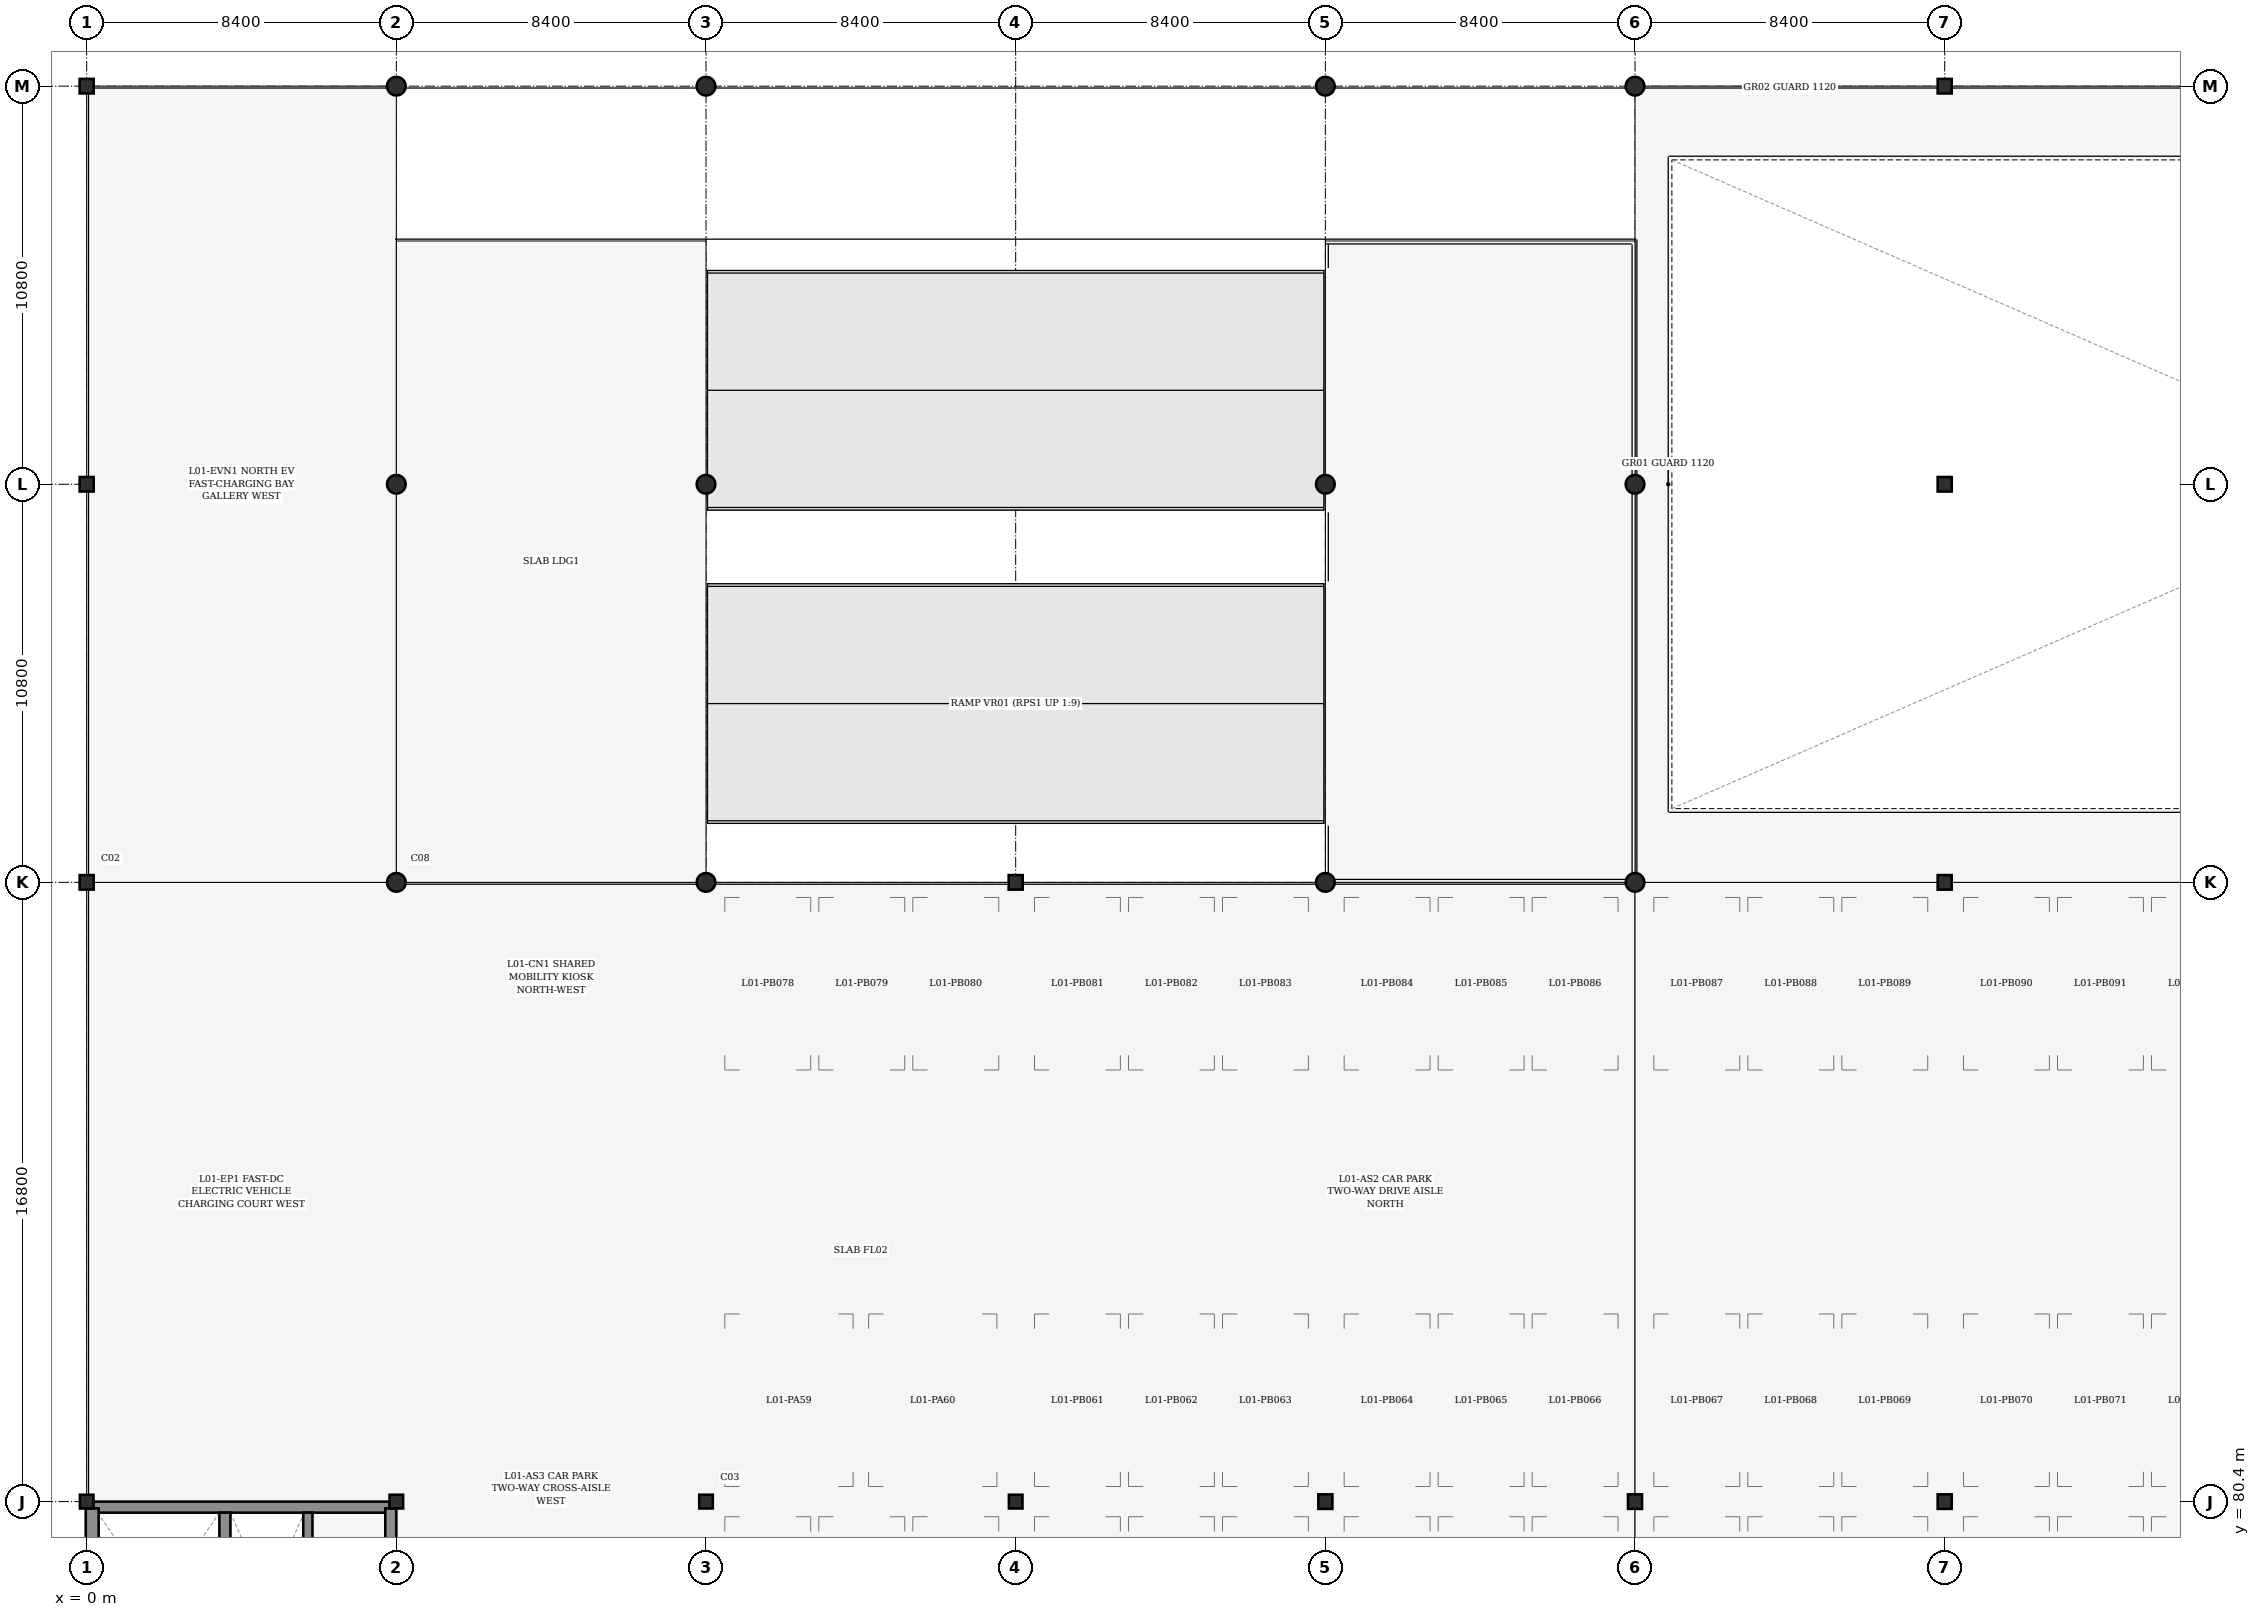
"""IFC4 building model, lengths in metres.
Left out: names, types, materials, properties, quantities, classifications, styles, units other than length and angle.
Written with IfcOpenShell. Run it as: python <this file> out.ifc"""

import sys

from ifc_helpers import new_model, si_unit, direction, frame, frame_2d, origin, origin_2d, place, context, subcontext, project, spatial, rectangle, hollow_circle, i_section, extrude, element, save


model = new_model("IFC4")
c1 = context("Model", 3, precision=1e-05, world=origin(), true_north=direction((0.0, 1.0)))
c2 = subcontext(c1, "Body", "Model", "MODEL_VIEW")
j1 = project(units=[si_unit("LENGTHUNIT", "METRE"), si_unit("PLANEANGLEUNIT", "RADIAN")], contexts=[c1])
p1 = place(None, origin())
s1 = spatial("IfcSite", under=j1, at=p1, CompositionType="ELEMENT")
p2 = place(p1, origin())
s2 = spatial("IfcBuilding", under=s1, at=p2, CompositionType="ELEMENT")
p3 = place(p2, frame((0.0, 0.0, 5.4)))
s3 = spatial("IfcBuildingStorey", under=s2, at=p3, CompositionType="ELEMENT", Elevation=5.4)
p4 = place(p3, frame((0.0, 80.4, 0.0), z_axis=(0.0, 0.0, 1.0), x_axis=(1.0, 0.0, 0.0)))
e1 = element("IfcColumn", 1, at=p4, inside=s3, PredefinedType="COLUMN", context=c2, shape_type="SweptSolid", body=[
    extrude(i_section(OverallWidth=0.373, OverallDepth=0.368, WebThickness=0.014, FlangeThickness=0.024, FilletRadius=0.015, at=origin_2d()), origin(), (0.0, 0.0, 1.0), 3.6),
])
for number, where, z_axis, x_axis in (
    (2, (0.0, 97.2, 0.0), (0.0, 0.0, 1.0), (1.0, 0.0, 0.0)),
    (3, (0.0, 108.0, 0.0), (0.0, 0.0, 1.0), (1.0, 0.0, 0.0)),
    (4, (0.0, 118.8, 0.0), (0.0, 0.0, 1.0), (1.0, 0.0, 0.0)),
):
    element("IfcColumn", number, at=place(p3, frame(where, z_axis=z_axis, x_axis=x_axis)), inside=s3, PredefinedType="COLUMN", context=c2, shape_type="SweptSolid", body=[
        extrude(i_section(OverallWidth=0.395, OverallDepth=0.381, WebThickness=0.018, FlangeThickness=0.03, FilletRadius=0.015, at=origin_2d()), origin(), (0.0, 0.0, 1.0), 3.6),
    ])
p5 = place(p3, frame((8.4, 80.4, 0.0), z_axis=(0.0, 0.0, 1.0), x_axis=(1.0, 0.0, 0.0)))
e5 = element("IfcColumn", 5, at=p5, inside=s3, PredefinedType="COLUMN", context=c2, shape_type="SweptSolid", body=[
    extrude(i_section(OverallWidth=0.373, OverallDepth=0.368, WebThickness=0.014, FlangeThickness=0.024, FilletRadius=0.015, at=origin_2d()), origin(), (0.0, 0.0, 1.0), 3.6),
])
for number, where, z_axis, x_axis in (
    (6, (8.4, 97.2, 0.0), (0.0, 0.0, 1.0), (1.0, 0.0, 0.0)),
    (7, (8.4, 108.0, 0.0), (0.0, 0.0, 1.0), (1.0, 0.0, 0.0)),
    (8, (8.4, 118.8, 0.0), (0.0, 0.0, 1.0), (1.0, 0.0, 0.0)),
):
    element("IfcColumn", number, at=place(p3, frame(where, z_axis=z_axis, x_axis=x_axis)), inside=s3, PredefinedType="COLUMN", context=c2, shape_type="SweptSolid", body=[
        extrude(hollow_circle(Radius=0.254, WallThickness=0.016, at=origin_2d()), origin(), (0.0, 0.0, 1.0), 3.6),
    ])
p6 = place(p3, frame((16.8, 80.4, 0.0), z_axis=(0.0, 0.0, 1.0), x_axis=(1.0, 0.0, 0.0)))
e9 = element("IfcColumn", 9, at=p6, inside=s3, PredefinedType="COLUMN", context=c2, shape_type="SweptSolid", body=[
    extrude(i_section(OverallWidth=0.373, OverallDepth=0.368, WebThickness=0.014, FlangeThickness=0.024, FilletRadius=0.015, at=origin_2d()), origin(), (0.0, 0.0, 1.0), 3.6),
])
for number, where, z_axis, x_axis in (
    (10, (16.8, 97.2, 0.0), (0.0, 0.0, 1.0), (1.0, 0.0, 0.0)),
    (11, (16.8, 108.0, 0.0), (0.0, 0.0, 1.0), (1.0, 0.0, 0.0)),
    (12, (16.8, 118.8, 0.0), (0.0, 0.0, 1.0), (1.0, 0.0, 0.0)),
):
    element("IfcColumn", number, at=place(p3, frame(where, z_axis=z_axis, x_axis=x_axis)), inside=s3, PredefinedType="COLUMN", context=c2, shape_type="SweptSolid", body=[
        extrude(hollow_circle(Radius=0.254, WallThickness=0.016, at=origin_2d()), origin(), (0.0, 0.0, 1.0), 3.6),
    ])
p7 = place(p3, frame((25.2, 80.4, 0.0), z_axis=(0.0, 0.0, 1.0), x_axis=(1.0, 0.0, 0.0)))
e13 = element("IfcColumn", 13, at=p7, inside=s3, PredefinedType="COLUMN", context=c2, shape_type="SweptSolid", body=[
    extrude(i_section(OverallWidth=0.373, OverallDepth=0.368, WebThickness=0.014, FlangeThickness=0.024, FilletRadius=0.015, at=origin_2d()), origin(), (0.0, 0.0, 1.0), 3.6),
])
for number, where, z_axis, x_axis in (
    (14, (25.2, 97.2, 0.0), (0.0, 0.0, 1.0), (1.0, 0.0, 0.0)),
    (15, (33.6, 80.4, 0.0), (0.0, 0.0, 1.0), (1.0, 0.0, 0.0)),
):
    element("IfcColumn", number, at=place(p3, frame(where, z_axis=z_axis, x_axis=x_axis)), inside=s3, PredefinedType="COLUMN", context=c2, shape_type="SweptSolid", body=[
        extrude(i_section(OverallWidth=0.395, OverallDepth=0.381, WebThickness=0.018, FlangeThickness=0.03, FilletRadius=0.015, at=origin_2d()), origin(), (0.0, 0.0, 1.0), 3.6),
    ])
for number, where, z_axis, x_axis in (
    (16, (33.6, 97.2, 0.0), (0.0, 0.0, 1.0), (1.0, 0.0, 0.0)),
    (17, (33.6, 108.0, 0.0), (0.0, 0.0, 1.0), (1.0, 0.0, 0.0)),
    (18, (33.6, 118.8, 0.0), (0.0, 0.0, 1.0), (1.0, 0.0, 0.0)),
):
    element("IfcColumn", number, at=place(p3, frame(where, z_axis=z_axis, x_axis=x_axis)), inside=s3, PredefinedType="COLUMN", context=c2, shape_type="SweptSolid", body=[
        extrude(hollow_circle(Radius=0.254, WallThickness=0.016, at=origin_2d()), origin(), (0.0, 0.0, 1.0), 3.6),
    ])
p8 = place(p3, frame((42.0, 80.4, 0.0), z_axis=(0.0, 0.0, 1.0), x_axis=(1.0, 0.0, 0.0)))
e19 = element("IfcColumn", 19, at=p8, inside=s3, PredefinedType="COLUMN", context=c2, shape_type="SweptSolid", body=[
    extrude(i_section(OverallWidth=0.395, OverallDepth=0.381, WebThickness=0.018, FlangeThickness=0.03, FilletRadius=0.015, at=origin_2d()), origin(), (0.0, 0.0, 1.0), 3.6),
])
for number, where, z_axis, x_axis in (
    (20, (42.0, 97.2, 0.0), (0.0, 0.0, 1.0), (1.0, 0.0, 0.0)),
    (21, (42.0, 108.0, 0.0), (0.0, 0.0, 1.0), (1.0, 0.0, 0.0)),
    (22, (42.0, 118.8, 0.0), (0.0, 0.0, 1.0), (1.0, 0.0, 0.0)),
):
    element("IfcColumn", number, at=place(p3, frame(where, z_axis=z_axis, x_axis=x_axis)), inside=s3, PredefinedType="COLUMN", context=c2, shape_type="SweptSolid", body=[
        extrude(hollow_circle(Radius=0.254, WallThickness=0.016, at=origin_2d()), origin(), (0.0, 0.0, 1.0), 3.6),
    ])
for number, where, z_axis, x_axis in (
    (23, (50.4, 80.4, 0.0), (0.0, 0.0, 1.0), (1.0, 0.0, 0.0)),
    (24, (50.4, 97.2, 0.0), (0.0, 0.0, 1.0), (1.0, 0.0, 0.0)),
    (25, (50.4, 108.0, 0.0), (0.0, 0.0, 1.0), (1.0, 0.0, 0.0)),
    (26, (50.4, 118.8, 0.0), (0.0, 0.0, 1.0), (1.0, 0.0, 0.0)),
):
    element("IfcColumn", number, at=place(p3, frame(where, z_axis=z_axis, x_axis=x_axis)), inside=s3, PredefinedType="COLUMN", context=c2, shape_type="SweptSolid", body=[
        extrude(i_section(OverallWidth=0.395, OverallDepth=0.381, WebThickness=0.018, FlangeThickness=0.03, FilletRadius=0.015, at=origin_2d()), origin(), (0.0, 0.0, 1.0), 3.6),
    ])
p9 = place(p3, frame((0.185, 80.25, 0.0), z_axis=(0.0, 0.0, 1.0), x_axis=(1.0, 0.0, 0.0)))
e27 = element("IfcWall", 27, at=p9, inside=s3, PredefinedType="SHEAR", context=c2, shape_type="SweptSolid", body=[
    extrude(rectangle(XDim=8.031, YDim=0.3, at=frame_2d((4.016, 0.0))), origin(), (0.0, 0.0, 1.0), 3.38),
])
p10 = place(p3, frame((0.15, 63.782, 0.0), z_axis=(0.0, 0.0, 1.0), x_axis=(0.0, 1.0, 0.0)))
e28 = element("IfcWall", 28, at=p10, inside=s3, PredefinedType="SHEAR", context=c2, shape_type="SweptSolid", body=[
    extrude(rectangle(XDim=16.436, YDim=0.35, at=frame_2d((8.218, 0.0))), origin(), (0.0, 0.0, 1.0), 3.38),
])
p11 = place(p3, frame((8.25, 63.782, 0.0), z_axis=(0.0, 0.0, 1.0), x_axis=(0.0, 1.0, 0.0)))
e29 = element("IfcWall", 29, at=p11, inside=s3, PredefinedType="SHEAR", context=c2, shape_type="SweptSolid", body=[
    extrude(rectangle(XDim=16.436, YDim=0.3, at=frame_2d((8.218, 0.0))), origin(), (0.0, 0.0, 1.0), 3.38),
])
p12 = place(p11, frame((5.668, 0.0, 0.0)))
e30 = element("IfcOpeningElement", 30, at=p12, cuts=e29, PredefinedType="OPENING", context=c2, shape_type="SweptSolid", body=[
    extrude(rectangle(XDim=1.25, YDim=2.15, at=frame_2d((0.625, 1.075))), frame((0.0, 0.16, 0.0), z_axis=(0.0, -1.0, 0.0), x_axis=(1.0, 0.0, 0.0)), (0.0, 0.0, 1.0), 0.32),
])
p13 = place(p3, frame((3.75, 63.9, 0.0), z_axis=(0.0, 0.0, 1.0), x_axis=(0.0, 1.0, 0.0)))
e31 = element("IfcWall", 31, at=p13, inside=s3, PredefinedType="SHEAR", context=c2, shape_type="SweptSolid", body=[
    extrude(rectangle(XDim=16.2, YDim=0.3, at=frame_2d((8.1, 0.0))), origin(), (0.0, 0.0, 1.0), 3.38),
])
p14 = place(p13, frame((0.5, 0.0, 0.0)))
e32 = element("IfcOpeningElement", 32, at=p14, cuts=e31, PredefinedType="OPENING", context=c2, shape_type="SweptSolid", body=[
    extrude(rectangle(XDim=1.15, YDim=2.15, at=frame_2d((0.575, 1.075))), frame((0.0, 0.16, 0.0), z_axis=(0.0, -1.0, 0.0), x_axis=(1.0, 0.0, 0.0)), (0.0, 0.0, 1.0), 0.32),
])
p15 = place(p3, frame((6.0, 75.55, 0.0), z_axis=(0.0, 0.0, 1.0), x_axis=(0.0, 1.0, 0.0)))
e33 = element("IfcWall", 33, at=p15, inside=s3, PredefinedType="PARTITIONING", context=c2, shape_type="SweptSolid", body=[
    extrude(rectangle(XDim=4.55, YDim=0.25, at=frame_2d((2.275, 0.0))), origin(), (0.0, 0.0, 1.0), 2.525),
])
save(model, sys.argv[1])
